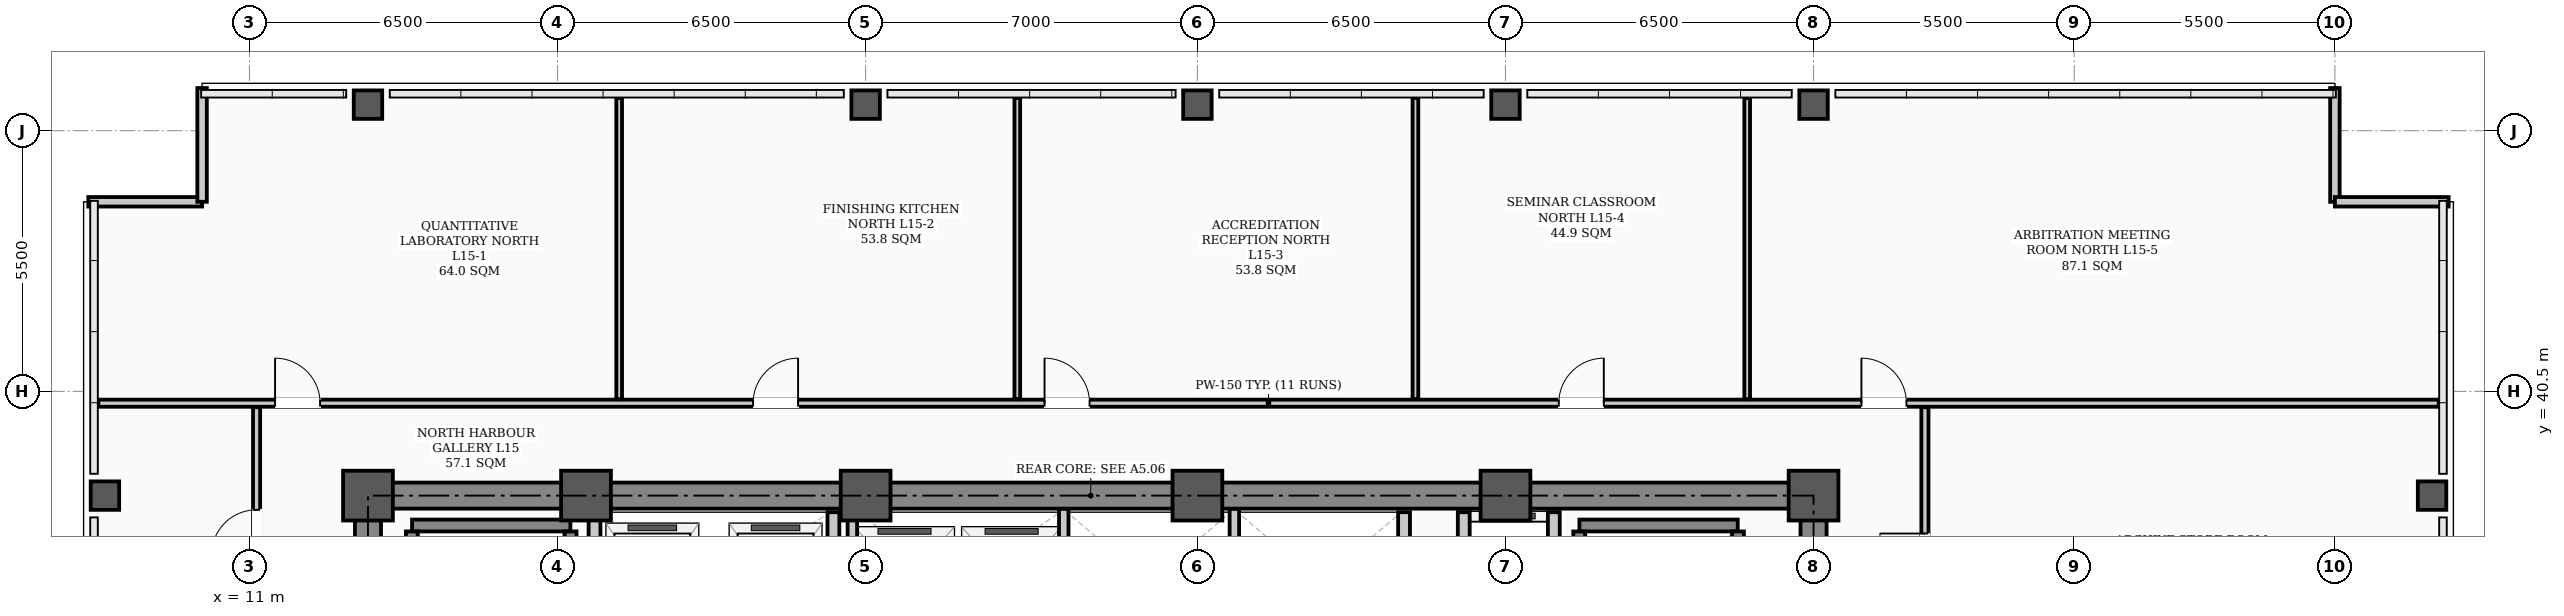
"""IFC4 building model, lengths in metres.
Left out: names, types, materials, properties, quantities, classifications, styles, units other than length and angle.
Written with IfcOpenShell. Run it as: python <this file> out.ifc"""

import sys

from ifc_helpers import new_model, si_unit, direction, frame, frame_2d, origin, origin_2d, place, context, subcontext, project, spatial, rectangle, hollow_rectangle, extrude, element, fill, save


model = new_model("IFC4")
c1 = context("Model", 3, precision=1e-05, world=origin(), true_north=direction((0.0, 1.0)))
c2 = subcontext(c1, "Body", "Model", "MODEL_VIEW")
j1 = project(units=[si_unit("LENGTHUNIT", "METRE"), si_unit("PLANEANGLEUNIT", "RADIAN")], contexts=[c1])
p1 = place(None, origin())
s1 = spatial("IfcSite", under=j1, at=p1, CompositionType="ELEMENT")
p2 = place(p1, origin())
s2 = spatial("IfcBuilding", under=s1, at=p2, CompositionType="ELEMENT")
p3 = place(p2, frame((0.0, 0.0, 61.6)))
s3 = spatial("IfcBuildingStorey", under=s2, at=p3, CompositionType="ELEMENT", Elevation=61.6)
for number, where, z_axis, x_axis in (
    (1, (13.5, 38.3, 0.0), (0.0, 0.0, 1.0), (1.0, 0.0, 0.0)),
    (2, (18.1, 38.3, 0.0), (0.0, 0.0, 1.0), (1.0, 0.0, 0.0)),
    (3, (24.0, 38.3, 0.0), (0.0, 0.0, 1.0), (1.0, 0.0, 0.0)),
    (4, (31.0, 38.3, 0.0), (0.0, 0.0, 1.0), (1.0, 0.0, 0.0)),
    (5, (37.5, 38.3, 0.0), (0.0, 0.0, 1.0), (1.0, 0.0, 0.0)),
    (6, (44.0, 38.3, 0.0), (0.0, 0.0, 1.0), (1.0, 0.0, 0.0)),
):
    element("IfcColumn", number, at=place(p3, frame(where, z_axis=z_axis, x_axis=x_axis)), inside=s3, PredefinedType="COLUMN", context=c2, shape_type="SweptSolid", body=[
        extrude(hollow_rectangle(XDim=1.05, YDim=1.05, WallThickness=0.038, InnerFilletRadius=0.019, OuterFilletRadius=0.057, at=origin_2d()), origin(), (0.0, 0.0, 1.0), 3.9),
    ])
for number, where, z_axis, x_axis in (
    (7, (7.95, 38.3, 0.0), (0.0, 0.0, 1.0), (1.0, 0.0, 0.0)),
    (8, (13.5, 46.55, 0.0), (0.0, 0.0, 1.0), (1.0, 0.0, 0.0)),
    (9, (24.0, 46.55, 0.0), (0.0, 0.0, 1.0), (1.0, 0.0, 0.0)),
    (10, (31.0, 46.55, 0.0), (0.0, 0.0, 1.0), (1.0, 0.0, 0.0)),
    (11, (37.5, 46.55, 0.0), (0.0, 0.0, 1.0), (1.0, 0.0, 0.0)),
    (12, (44.0, 46.55, 0.0), (0.0, 0.0, 1.0), (1.0, 0.0, 0.0)),
    (13, (57.05, 38.3, 0.0), (0.0, 0.0, 1.0), (1.0, 0.0, 0.0)),
):
    element("IfcColumn", number, at=place(p3, frame(where, z_axis=z_axis, x_axis=x_axis)), inside=s3, PredefinedType="COLUMN", context=c2, shape_type="SweptSolid", body=[
        extrude(hollow_rectangle(XDim=0.6, YDim=0.6, WallThickness=0.026, InnerFilletRadius=0.013, OuterFilletRadius=0.039, at=origin_2d()), origin(), (0.0, 0.0, 1.0), 3.9),
    ])
for number, where, z_axis, x_axis in (
    (14, (7.6, 44.5, 0.0), (0.0, 0.0, 1.0), (1.0, 0.0, 0.0)),
    (15, (10.0, 44.5, 0.0), (0.0, 0.0, 1.0), (0.0, 1.0, 0.0)),
    (16, (55.0, 46.9, 0.0), (0.0, 0.0, 1.0), (0.0, -1.0, 0.0)),
    (17, (55.0, 44.5, 0.0), (0.0, 0.0, 1.0), (1.0, 0.0, 0.0)),
):
    element("IfcWall", number, at=place(p3, frame(where, z_axis=z_axis, x_axis=x_axis)), inside=s3, PredefinedType="PARAPET", context=c2, shape_type="SweptSolid", body=[
        extrude(rectangle(XDim=2.4, YDim=0.2, at=frame_2d((1.2, 0.0))), origin(), (0.0, 0.0, 1.0), 1.2),
    ])
p4 = place(p3, frame((13.5, 38.3, 0.0), z_axis=(0.0, 0.0, 1.0), x_axis=(1.0, 0.0, 0.0)))
e18 = element("IfcWall", 18, at=p4, inside=s3, PredefinedType="SHEAR", context=c2, shape_type="SweptSolid", body=[
    extrude(rectangle(XDim=30.5, YDim=0.55, at=frame_2d((15.25, 0.0))), origin(), (0.0, 0.0, 1.0), 3.72),
])
for number, where, z_axis, x_axis in (
    (19, (13.5, 29.35, 0.0), (0.0, 0.0, 1.0), (0.0, 1.0, 0.0)),
    (20, (44.0, 29.35, 0.0), (0.0, 0.0, 1.0), (0.0, 1.0, 0.0)),
):
    element("IfcWall", number, at=place(p3, frame(where, z_axis=z_axis, x_axis=x_axis)), inside=s3, PredefinedType="SHEAR", context=c2, shape_type="SweptSolid", body=[
        extrude(rectangle(XDim=8.6, YDim=0.55, at=frame_2d((4.3, 0.0))), origin(), (0.0, 0.0, 1.0), 3.72),
    ])
p5 = place(p3, frame((14.43, 37.669, 0.0), z_axis=(0.0, 0.0, 1.0), x_axis=(1.0, 0.0, 0.0)))
e21 = element("IfcWall", 21, at=p5, inside=s3, PredefinedType="STANDARD", context=c2, shape_type="SweptSolid", body=[
    extrude(rectangle(XDim=3.34, YDim=0.25, at=frame_2d((1.67, 0.0))), origin(), (0.0, 0.0, 1.0), 3.72),
])
for number, where, z_axis, x_axis in (
    (22, (14.425, 30.36, 0.0), (0.0, 0.0, 1.0), (0.0, 1.0, 0.0)),
    (23, (17.775, 30.36, 0.0), (0.0, 0.0, 1.0), (0.0, 1.0, 0.0)),
):
    element("IfcWall", number, at=place(p3, frame(where, z_axis=z_axis, x_axis=x_axis)), inside=s3, PredefinedType="STANDARD", context=c2, shape_type="SweptSolid", body=[
        extrude(rectangle(XDim=7.184, YDim=0.25, at=frame_2d((3.592, 0.0))), origin(), (0.0, 0.0, 1.0), 3.72),
    ])
p6 = place(p3, frame((39.06, 37.669, 0.0), z_axis=(0.0, 0.0, 1.0), x_axis=(1.0, 0.0, 0.0)))
e24 = element("IfcWall", 24, at=p6, inside=s3, PredefinedType="STANDARD", context=c2, shape_type="SweptSolid", body=[
    extrude(rectangle(XDim=3.34, YDim=0.25, at=frame_2d((1.67, 0.0))), origin(), (0.0, 0.0, 1.0), 3.72),
])
for number, where, z_axis, x_axis in (
    (25, (39.055, 30.36, 0.0), (0.0, 0.0, 1.0), (0.0, 1.0, 0.0)),
    (26, (42.405, 30.36, 0.0), (0.0, 0.0, 1.0), (0.0, 1.0, 0.0)),
):
    element("IfcWall", number, at=place(p3, frame(where, z_axis=z_axis, x_axis=x_axis)), inside=s3, PredefinedType="STANDARD", context=c2, shape_type="SweptSolid", body=[
        extrude(rectangle(XDim=7.184, YDim=0.25, at=frame_2d((3.592, 0.0))), origin(), (0.0, 0.0, 1.0), 3.72),
    ])
p7 = place(p3, frame((36.62, 31.95, 0.0), z_axis=(0.0, 0.0, 1.0), x_axis=(0.0, 1.0, 0.0)))
e27 = element("IfcWall", 27, at=p7, inside=s3, PredefinedType="STANDARD", context=c2, shape_type="SweptSolid", body=[
    extrude(rectangle(XDim=6.0, YDim=0.25, at=frame_2d((3.0, 0.0))), origin(), (0.0, 0.0, 1.0), 3.3),
])
p8 = place(p7, frame((0.9, 0.0, 0.0)))
e28 = element("IfcOpeningElement", 28, at=p8, cuts=e27, PredefinedType="OPENING", context=c2, shape_type="SweptSolid", body=[
    extrude(rectangle(XDim=1.1, YDim=2.08, at=frame_2d((0.55, 1.04))), frame((0.0, 0.135, 0.0), z_axis=(0.0, -1.0, 0.0), x_axis=(1.0, 0.0, 0.0)), (0.0, 0.0, 1.0), 0.27),
])
p9 = place(p7, frame((4.0, 0.0, 0.0)))
e29 = element("IfcOpeningElement", 29, at=p9, cuts=e27, PredefinedType="OPENING", context=c2, shape_type="SweptSolid", body=[
    extrude(rectangle(XDim=1.1, YDim=2.08, at=frame_2d((0.55, 1.04))), frame((0.0, 0.135, 0.0), z_axis=(0.0, -1.0, 0.0), x_axis=(1.0, 0.0, 0.0)), (0.0, 0.0, 1.0), 0.27),
])
p10 = place(p3, frame((38.52, 31.95, 0.0), z_axis=(0.0, 0.0, 1.0), x_axis=(0.0, 1.0, 0.0)))
e30 = element("IfcWall", 30, at=p10, inside=s3, PredefinedType="STANDARD", context=c2, shape_type="SweptSolid", body=[
    extrude(rectangle(XDim=6.0, YDim=0.25, at=frame_2d((3.0, 0.0))), origin(), (0.0, 0.0, 1.0), 3.3),
])
for number, where, z_axis, x_axis in (
    (31, (18.28, 34.62, 0.0), (0.0, 0.0, 1.0), (0.0, 1.0, 0.0)),
    (32, (23.32, 34.62, 0.0), (0.0, 0.0, 1.0), (0.0, 1.0, 0.0)),
):
    element("IfcWall", number, at=place(p3, frame(where, z_axis=z_axis, x_axis=x_axis)), inside=s3, PredefinedType="STANDARD", context=c2, shape_type="SweptSolid", body=[
        extrude(rectangle(XDim=3.33, YDim=0.25, at=frame_2d((1.665, 0.0))), origin(), (0.0, 0.0, 1.0), 3.3),
    ])
p11 = place(p3, frame((35.36, 34.9, 0.0), z_axis=(0.0, 0.0, 1.0), x_axis=(0.0, 1.0, 0.0)))
e33 = element("IfcWall", 33, at=p11, inside=s3, PredefinedType="STANDARD", context=c2, shape_type="SweptSolid", body=[
    extrude(rectangle(XDim=3.05, YDim=0.25, at=frame_2d((1.525, 0.0))), origin(), (0.0, 0.0, 1.0), 3.3),
])
p12 = place(p3, frame((7.81, 40.25, 0.0), z_axis=(0.0, 0.0, 1.0), x_axis=(1.0, 0.0, 0.0)))
e34 = element("IfcWall", 34, at=p12, inside=s3, PredefinedType="PARTITIONING", context=c2, shape_type="SweptSolid", body=[
    extrude(rectangle(XDim=49.38, YDim=0.15, at=frame_2d((24.69, 0.0))), origin(), (0.0, 0.0, 1.0), 3.1),
])
p13 = place(p12, frame((3.73, 0.0, 0.0)))
e35 = element("IfcOpeningElement", 35, at=p13, cuts=e34, PredefinedType="OPENING", context=c2, shape_type="SweptSolid", body=[
    extrude(rectangle(XDim=0.95, YDim=2.08, at=frame_2d((0.475, 1.04))), frame((0.0, 0.085, 0.0), z_axis=(0.0, -1.0, 0.0), x_axis=(1.0, 0.0, 0.0)), (0.0, 0.0, 1.0), 0.17),
])
p14 = place(p12, frame((13.815, 0.0, 0.0)))
e36 = element("IfcOpeningElement", 36, at=p14, cuts=e34, PredefinedType="OPENING", context=c2, shape_type="SweptSolid", body=[
    extrude(rectangle(XDim=0.95, YDim=2.08, at=frame_2d((0.475, 1.04))), frame((0.0, 0.085, 0.0), z_axis=(0.0, -1.0, 0.0), x_axis=(1.0, 0.0, 0.0)), (0.0, 0.0, 1.0), 0.17),
])
p15 = place(p12, frame((19.965, 0.0, 0.0)))
e37 = element("IfcOpeningElement", 37, at=p15, cuts=e34, PredefinedType="OPENING", context=c2, shape_type="SweptSolid", body=[
    extrude(rectangle(XDim=0.95, YDim=2.08, at=frame_2d((0.475, 1.04))), frame((0.0, 0.085, 0.0), z_axis=(0.0, -1.0, 0.0), x_axis=(1.0, 0.0, 0.0)), (0.0, 0.0, 1.0), 0.17),
])
p16 = place(p12, frame((30.815, 0.0, 0.0)))
e38 = element("IfcOpeningElement", 38, at=p16, cuts=e34, PredefinedType="OPENING", context=c2, shape_type="SweptSolid", body=[
    extrude(rectangle(XDim=0.95, YDim=2.08, at=frame_2d((0.475, 1.04))), frame((0.0, 0.085, 0.0), z_axis=(0.0, -1.0, 0.0), x_axis=(1.0, 0.0, 0.0)), (0.0, 0.0, 1.0), 0.17),
])
p17 = place(p12, frame((37.2, 0.0, 0.0)))
e39 = element("IfcOpeningElement", 39, at=p17, cuts=e34, PredefinedType="OPENING", context=c2, shape_type="SweptSolid", body=[
    extrude(rectangle(XDim=0.95, YDim=2.08, at=frame_2d((0.475, 1.04))), frame((0.0, 0.085, 0.0), z_axis=(0.0, -1.0, 0.0), x_axis=(1.0, 0.0, 0.0)), (0.0, 0.0, 1.0), 0.17),
])
p18 = place(p3, frame((11.15, 17.635, 0.0), z_axis=(0.0, 0.0, 1.0), x_axis=(0.0, 1.0, 0.0)))
e40 = element("IfcWall", 40, at=p18, inside=s3, PredefinedType="PARTITIONING", context=c2, shape_type="SweptSolid", body=[
    extrude(rectangle(XDim=22.53, YDim=0.15, at=frame_2d((11.265, 0.0))), origin(), (0.0, 0.0, 1.0), 3.0),
])
p19 = place(p18, frame((3.065, 0.0, 0.0)))
e41 = element("IfcOpeningElement", 41, at=p19, cuts=e40, PredefinedType="OPENING", context=c2, shape_type="SweptSolid", body=[
    extrude(rectangle(XDim=0.95, YDim=2.08, at=frame_2d((0.475, 1.04))), frame((0.0, 0.085, 0.0), z_axis=(0.0, -1.0, 0.0), x_axis=(1.0, 0.0, 0.0)), (0.0, 0.0, 1.0), 0.17),
])
p20 = place(p18, frame((9.09, 0.0, 0.0)))
e42 = element("IfcOpeningElement", 42, at=p20, cuts=e40, PredefinedType="OPENING", context=c2, shape_type="SweptSolid", body=[
    extrude(rectangle(XDim=0.95, YDim=2.08, at=frame_2d((0.475, 1.04))), frame((0.0, 0.085, 0.0), z_axis=(0.0, -1.0, 0.0), x_axis=(1.0, 0.0, 0.0)), (0.0, 0.0, 1.0), 0.17),
])
p21 = place(p18, frame((14.09, 0.0, 0.0)))
e43 = element("IfcOpeningElement", 43, at=p21, cuts=e40, PredefinedType="OPENING", context=c2, shape_type="SweptSolid", body=[
    extrude(rectangle(XDim=0.95, YDim=2.08, at=frame_2d((0.475, 1.04))), frame((0.0, 0.085, 0.0), z_axis=(0.0, -1.0, 0.0), x_axis=(1.0, 0.0, 0.0)), (0.0, 0.0, 1.0), 0.17),
])
p22 = place(p18, frame((19.415, 0.0, 0.0)))
e44 = element("IfcOpeningElement", 44, at=p22, cuts=e40, PredefinedType="OPENING", context=c2, shape_type="SweptSolid", body=[
    extrude(rectangle(XDim=0.95, YDim=2.08, at=frame_2d((0.475, 1.04))), frame((0.0, 0.085, 0.0), z_axis=(0.0, -1.0, 0.0), x_axis=(1.0, 0.0, 0.0)), (0.0, 0.0, 1.0), 0.17),
])
p23 = place(p3, frame((46.35, 17.635, 0.0), z_axis=(0.0, 0.0, 1.0), x_axis=(0.0, 1.0, 0.0)))
e45 = element("IfcWall", 45, at=p23, inside=s3, PredefinedType="PARTITIONING", context=c2, shape_type="SweptSolid", body=[
    extrude(rectangle(XDim=22.53, YDim=0.15, at=frame_2d((11.265, 0.0))), origin(), (0.0, 0.0, 1.0), 3.0),
])
p24 = place(p23, frame((4.265, 0.0, 0.0)))
e46 = element("IfcOpeningElement", 46, at=p24, cuts=e45, PredefinedType="OPENING", context=c2, shape_type="SweptSolid", body=[
    extrude(rectangle(XDim=0.95, YDim=2.08, at=frame_2d((0.475, 1.04))), frame((0.0, 0.085, 0.0), z_axis=(0.0, -1.0, 0.0), x_axis=(1.0, 0.0, 0.0)), (0.0, 0.0, 1.0), 0.17),
])
p25 = place(p23, frame((12.39, 0.0, 0.0)))
e47 = element("IfcOpeningElement", 47, at=p25, cuts=e45, PredefinedType="OPENING", context=c2, shape_type="SweptSolid", body=[
    extrude(rectangle(XDim=0.95, YDim=2.08, at=frame_2d((0.475, 1.04))), frame((0.0, 0.085, 0.0), z_axis=(0.0, -1.0, 0.0), x_axis=(1.0, 0.0, 0.0)), (0.0, 0.0, 1.0), 0.17),
])
p26 = place(p23, frame((18.915, 0.0, 0.0)))
e48 = element("IfcOpeningElement", 48, at=p26, cuts=e45, PredefinedType="OPENING", context=c2, shape_type="SweptSolid", body=[
    extrude(rectangle(XDim=0.95, YDim=2.08, at=frame_2d((0.475, 1.04))), frame((0.0, 0.085, 0.0), z_axis=(0.0, -1.0, 0.0), x_axis=(1.0, 0.0, 0.0)), (0.0, 0.0, 1.0), 0.17),
])
for number, where, z_axis, x_axis in (
    (49, (18.8, 40.335, 0.0), (0.0, 0.0, 1.0), (0.0, 1.0, 0.0)),
    (50, (27.2, 40.335, 0.0), (0.0, 0.0, 1.0), (0.0, 1.0, 0.0)),
    (51, (35.6, 40.335, 0.0), (0.0, 0.0, 1.0), (0.0, 1.0, 0.0)),
    (52, (42.6, 40.335, 0.0), (0.0, 0.0, 1.0), (0.0, 1.0, 0.0)),
):
    element("IfcWall", number, at=place(p3, frame(where, z_axis=z_axis, x_axis=x_axis)), inside=s3, PredefinedType="PARTITIONING", context=c2, shape_type="SweptSolid", body=[
        extrude(rectangle(XDim=6.355, YDim=0.12, at=frame_2d((3.177, 0.0))), origin(), (0.0, 0.0, 1.0), 3.212),
    ])
p27 = place(p3, frame((23.72, 34.9, 0.0), z_axis=(0.0, 0.0, 1.0), x_axis=(0.0, 1.0, 0.0)))
e53 = element("IfcWall", 53, at=p27, inside=s3, PredefinedType="STANDARD", context=c2, shape_type="SweptSolid", body=[
    extrude(rectangle(XDim=3.12, YDim=0.2, at=frame_2d((1.56, 0.0))), origin(), (0.0, 0.0, 1.0), 3.1),
])
for number, where, z_axis, x_axis in (
    (54, (28.18, 34.9, 0.0), (0.0, 0.0, 1.0), (0.0, 1.0, 0.0)),
    (55, (31.78, 34.9, 0.0), (0.0, 0.0, 1.0), (0.0, 1.0, 0.0)),
):
    element("IfcWall", number, at=place(p3, frame(where, z_axis=z_axis, x_axis=x_axis)), inside=s3, PredefinedType="STANDARD", context=c2, shape_type="SweptSolid", body=[
        extrude(rectangle(XDim=3.12, YDim=0.2, at=frame_2d((1.56, 0.0))), origin(), (0.0, 0.0, 1.0), 3.3),
    ])
p28 = place(p22, origin())
e56 = element("IfcDoor", 56, at=p28, inside=s3, OperationType="SINGLE_SWING_LEFT", PredefinedType="DOOR", context=c2, shape_type="SweptSolid", body=[
    extrude(rectangle(XDim=0.95, YDim=2.08, at=frame_2d((0.475, 1.04))), frame((0.0, 0.025, 0.0), z_axis=(0.0, -1.0, 0.0), x_axis=(1.0, 0.0, 0.0)), (0.0, 0.0, 1.0), 0.05),
])
fill(e44, e56)
p29 = place(p26, origin())
e57 = element("IfcDoor", 57, at=p29, inside=s3, OperationType="SINGLE_SWING_RIGHT", PredefinedType="DOOR", context=c2, shape_type="SweptSolid", body=[
    extrude(rectangle(XDim=0.95, YDim=2.08, at=frame_2d((0.475, 1.04))), frame((0.0, 0.025, 0.0), z_axis=(0.0, -1.0, 0.0), x_axis=(1.0, 0.0, 0.0)), (0.0, 0.0, 1.0), 0.05),
])
fill(e48, e57)
p30 = place(p13, origin())
e58 = element("IfcDoor", 58, at=p30, inside=s3, OperationType="SINGLE_SWING_LEFT", PredefinedType="DOOR", context=c2, shape_type="SweptSolid", body=[
    extrude(rectangle(XDim=0.95, YDim=2.08, at=frame_2d((0.475, 1.04))), frame((0.0, 0.025, 0.0), z_axis=(0.0, -1.0, 0.0), x_axis=(1.0, 0.0, 0.0)), (0.0, 0.0, 1.0), 0.05),
])
fill(e35, e58)
p31 = place(p14, origin())
e59 = element("IfcDoor", 59, at=p31, inside=s3, OperationType="SINGLE_SWING_RIGHT", PredefinedType="DOOR", context=c2, shape_type="SweptSolid", body=[
    extrude(rectangle(XDim=0.95, YDim=2.08, at=frame_2d((0.475, 1.04))), frame((0.0, 0.025, 0.0), z_axis=(0.0, -1.0, 0.0), x_axis=(1.0, 0.0, 0.0)), (0.0, 0.0, 1.0), 0.05),
])
fill(e36, e59)
p32 = place(p15, origin())
e60 = element("IfcDoor", 60, at=p32, inside=s3, OperationType="SINGLE_SWING_LEFT", PredefinedType="DOOR", context=c2, shape_type="SweptSolid", body=[
    extrude(rectangle(XDim=0.95, YDim=2.08, at=frame_2d((0.475, 1.04))), frame((0.0, 0.025, 0.0), z_axis=(0.0, -1.0, 0.0), x_axis=(1.0, 0.0, 0.0)), (0.0, 0.0, 1.0), 0.05),
])
fill(e37, e60)
p33 = place(p16, origin())
e61 = element("IfcDoor", 61, at=p33, inside=s3, OperationType="SINGLE_SWING_RIGHT", PredefinedType="DOOR", context=c2, shape_type="SweptSolid", body=[
    extrude(rectangle(XDim=0.95, YDim=2.08, at=frame_2d((0.475, 1.04))), frame((0.0, 0.025, 0.0), z_axis=(0.0, -1.0, 0.0), x_axis=(1.0, 0.0, 0.0)), (0.0, 0.0, 1.0), 0.05),
])
fill(e38, e61)
p34 = place(p17, origin())
e62 = element("IfcDoor", 62, at=p34, inside=s3, OperationType="SINGLE_SWING_LEFT", PredefinedType="DOOR", context=c2, shape_type="SweptSolid", body=[
    extrude(rectangle(XDim=0.95, YDim=2.08, at=frame_2d((0.475, 1.04))), frame((0.0, 0.025, 0.0), z_axis=(0.0, -1.0, 0.0), x_axis=(1.0, 0.0, 0.0)), (0.0, 0.0, 1.0), 0.05),
])
fill(e39, e62)
save(model, sys.argv[1])
